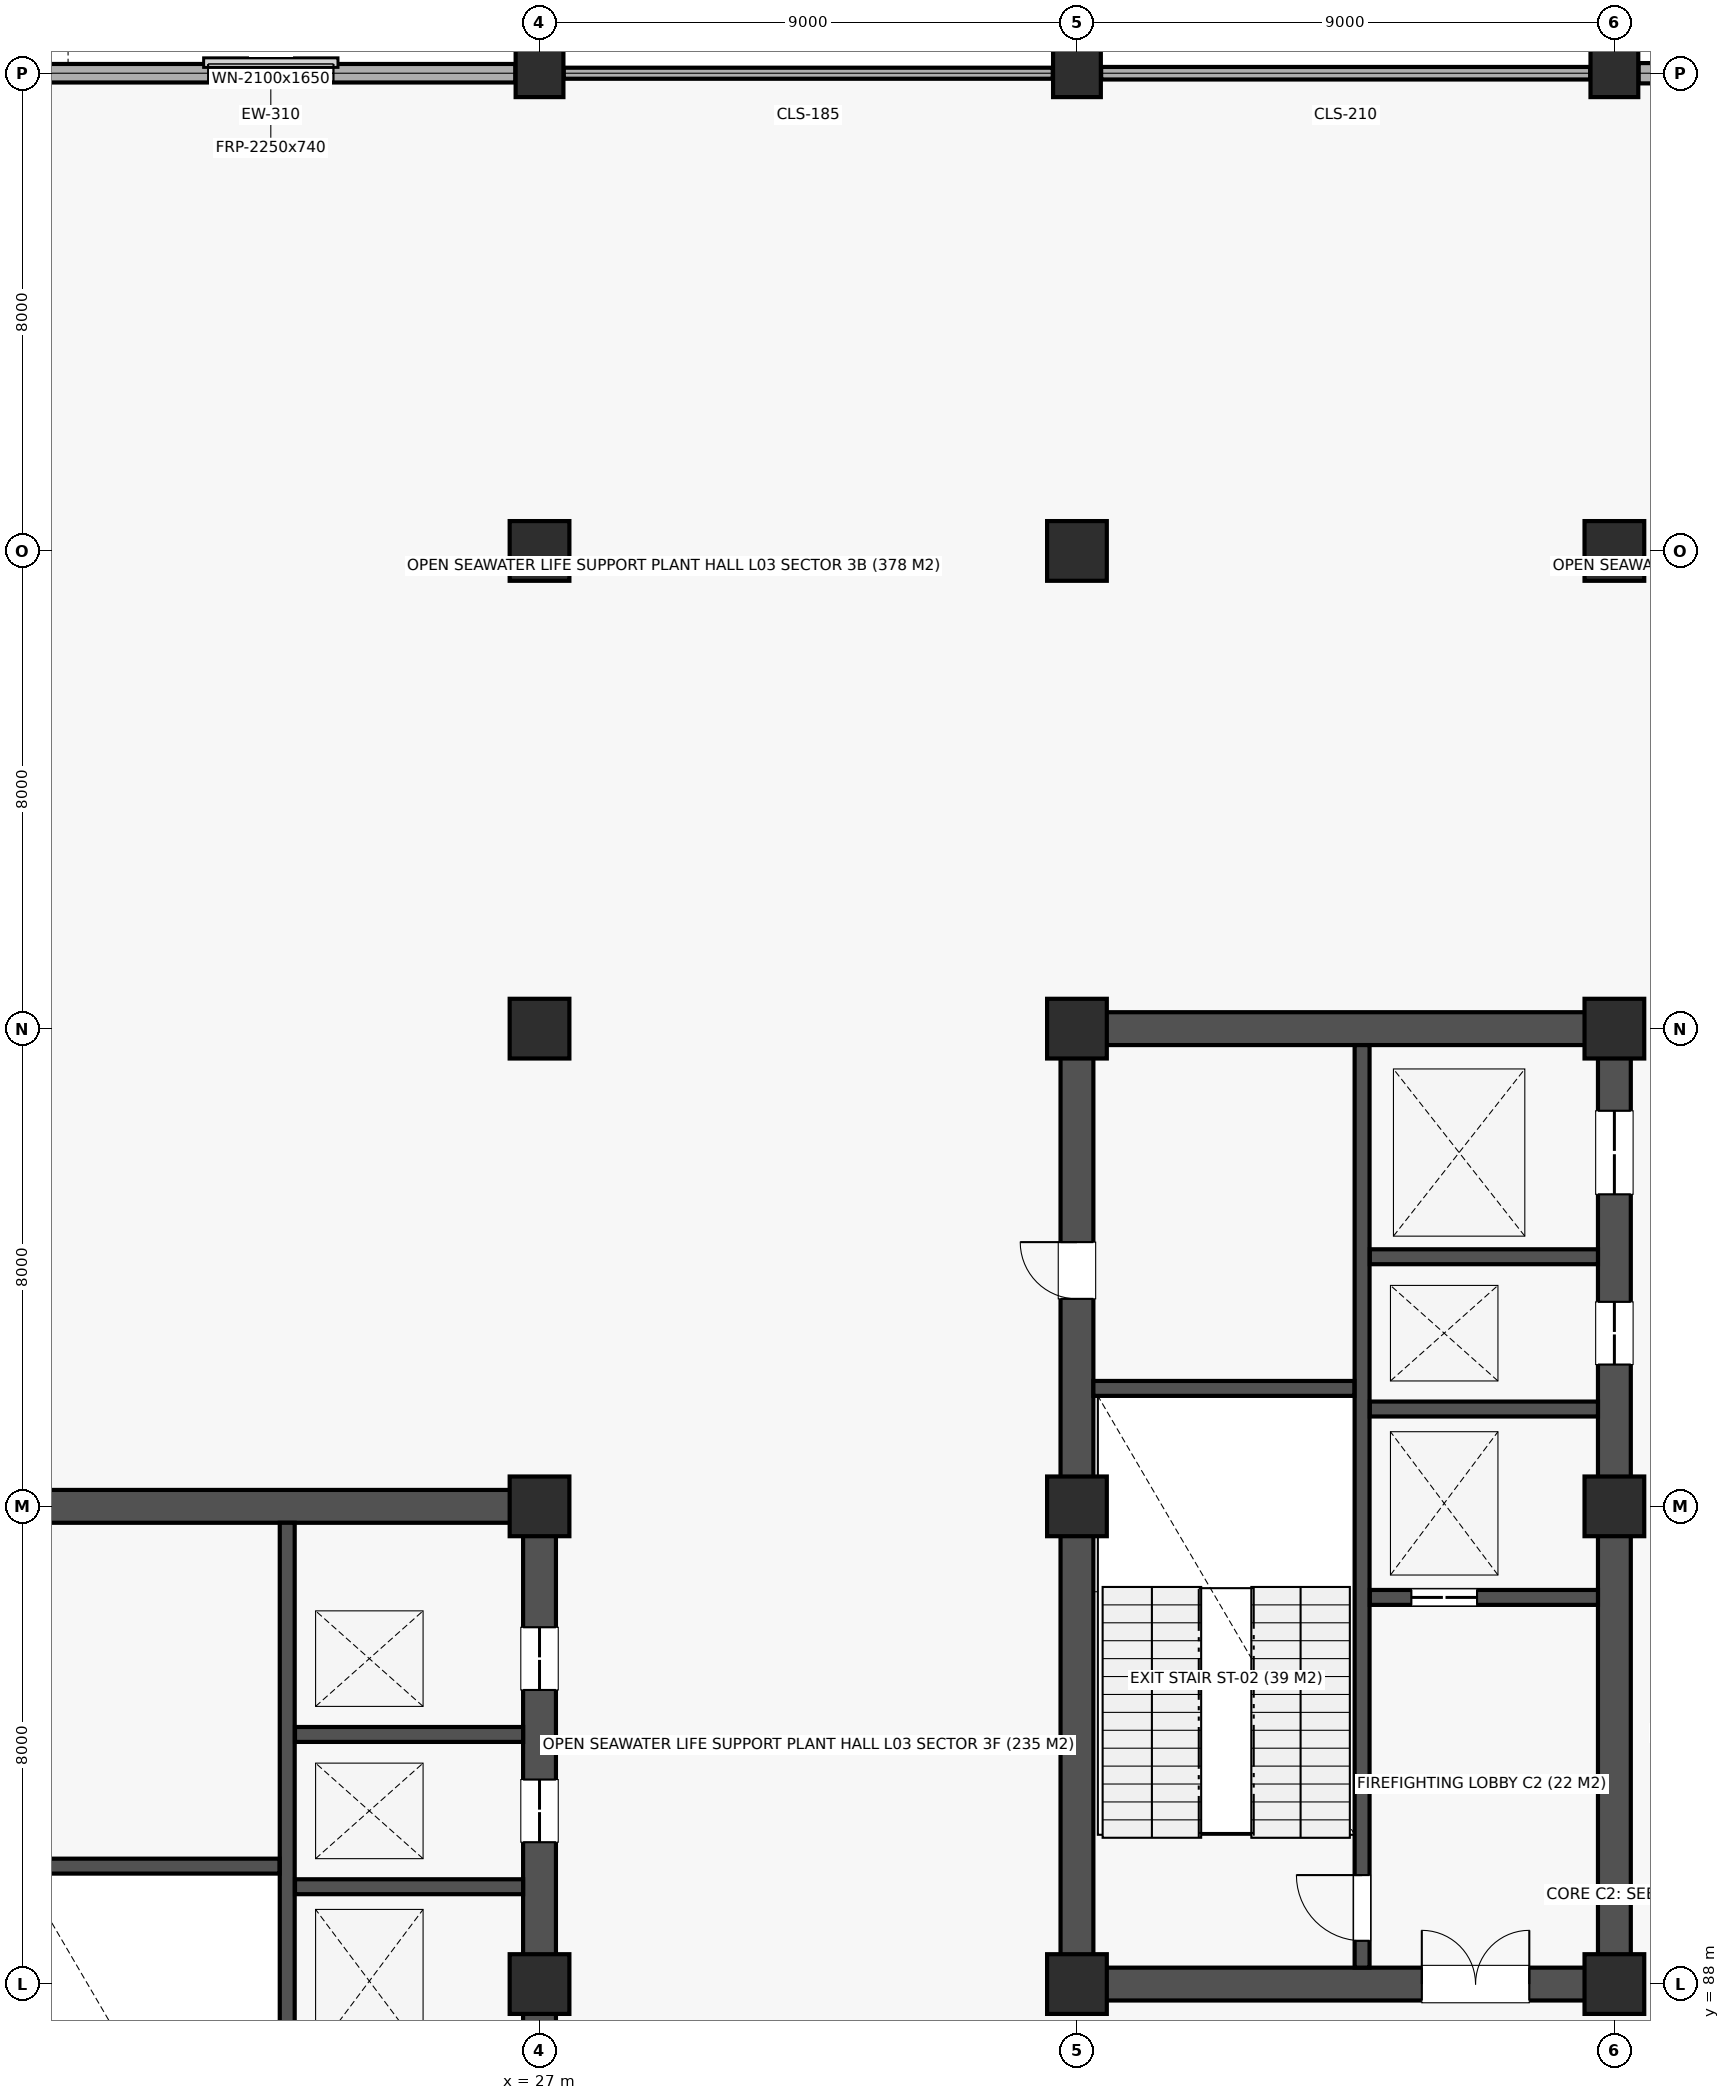
"""IFC4 building model, lengths in metres.
Left out: names, types, materials, properties, quantities, classifications, styles, units other than length and angle.
Written with IfcOpenShell. Run it as: python <this file> out.ifc"""

import sys

from ifc_helpers import new_model, si_unit, direction, frame, frame_2d, origin, origin_2d, place, context, subcontext, project, spatial, rectangle, extrude, element, fill, save


model = new_model("IFC4")
c1 = context("Model", 3, precision=1e-05, world=origin(), true_north=direction((0.0, 1.0)))
c2 = subcontext(c1, "Body", "Model", "MODEL_VIEW")
j1 = project(units=[si_unit("LENGTHUNIT", "METRE"), si_unit("PLANEANGLEUNIT", "RADIAN")], contexts=[c1])
p1 = place(None, origin())
s1 = spatial("IfcSite", under=j1, at=p1, CompositionType="ELEMENT")
p2 = place(p1, origin())
s2 = spatial("IfcBuilding", under=s1, at=p2, CompositionType="ELEMENT")
p3 = place(p2, frame((0.0, 0.0, 13.5)))
s3 = spatial("IfcBuildingStorey", under=s2, at=p3, CompositionType="ELEMENT", Elevation=13.5)
for number, where, z_axis, x_axis in (
    (1, (27.0, 88.0, 0.0), (0.0, 0.0, 1.0), (1.0, 0.0, 0.0)),
    (2, (27.0, 96.0, 0.0), (0.0, 0.0, 1.0), (1.0, 0.0, 0.0)),
    (3, (27.0, 104.0, 0.0), (0.0, 0.0, 1.0), (1.0, 0.0, 0.0)),
    (4, (27.0, 112.0, 0.0), (0.0, 0.0, 1.0), (1.0, 0.0, 0.0)),
):
    element("IfcColumn", number, at=place(p3, frame(where, z_axis=z_axis, x_axis=x_axis)), inside=s3, PredefinedType="COLUMN", context=c2, shape_type="SweptSolid", body=[
        extrude(rectangle(XDim=1.0, YDim=1.0, at=origin_2d()), origin(), (0.0, 0.0, 1.0), 4.5),
    ])
p4 = place(p3, frame((27.0, 120.0, 0.0), z_axis=(0.0, 0.0, 1.0), x_axis=(1.0, 0.0, 0.0)))
e5 = element("IfcColumn", 5, at=p4, inside=s3, PredefinedType="COLUMN", context=c2, shape_type="SweptSolid", body=[
    extrude(rectangle(XDim=0.8, YDim=0.8, at=origin_2d()), origin(), (0.0, 0.0, 1.0), 4.2),
])
for number, where, z_axis, x_axis in (
    (6, (36.0, 88.0, 0.0), (0.0, 0.0, 1.0), (1.0, 0.0, 0.0)),
    (7, (36.0, 96.0, 0.0), (0.0, 0.0, 1.0), (1.0, 0.0, 0.0)),
    (8, (36.0, 104.0, 0.0), (0.0, 0.0, 1.0), (1.0, 0.0, 0.0)),
    (9, (36.0, 112.0, 0.0), (0.0, 0.0, 1.0), (1.0, 0.0, 0.0)),
):
    element("IfcColumn", number, at=place(p3, frame(where, z_axis=z_axis, x_axis=x_axis)), inside=s3, PredefinedType="COLUMN", context=c2, shape_type="SweptSolid", body=[
        extrude(rectangle(XDim=1.0, YDim=1.0, at=origin_2d()), origin(), (0.0, 0.0, 1.0), 4.5),
    ])
p5 = place(p3, frame((36.0, 120.0, 0.0), z_axis=(0.0, 0.0, 1.0), x_axis=(1.0, 0.0, 0.0)))
e10 = element("IfcColumn", 10, at=p5, inside=s3, PredefinedType="COLUMN", context=c2, shape_type="SweptSolid", body=[
    extrude(rectangle(XDim=0.8, YDim=0.8, at=origin_2d()), origin(), (0.0, 0.0, 1.0), 4.2),
])
for number, where, z_axis, x_axis in (
    (11, (45.0, 88.0, 0.0), (0.0, 0.0, 1.0), (1.0, 0.0, 0.0)),
    (12, (45.0, 96.0, 0.0), (0.0, 0.0, 1.0), (1.0, 0.0, 0.0)),
    (13, (45.0, 104.0, 0.0), (0.0, 0.0, 1.0), (1.0, 0.0, 0.0)),
    (14, (45.0, 112.0, 0.0), (0.0, 0.0, 1.0), (1.0, 0.0, 0.0)),
):
    element("IfcColumn", number, at=place(p3, frame(where, z_axis=z_axis, x_axis=x_axis)), inside=s3, PredefinedType="COLUMN", context=c2, shape_type="SweptSolid", body=[
        extrude(rectangle(XDim=1.0, YDim=1.0, at=origin_2d()), origin(), (0.0, 0.0, 1.0), 4.5),
    ])
p6 = place(p3, frame((45.0, 120.0, 0.0), z_axis=(0.0, 0.0, 1.0), x_axis=(1.0, 0.0, 0.0)))
e15 = element("IfcColumn", 15, at=p6, inside=s3, PredefinedType="COLUMN", context=c2, shape_type="SweptSolid", body=[
    extrude(rectangle(XDim=0.8, YDim=0.8, at=origin_2d()), origin(), (0.0, 0.0, 1.0), 4.2),
])
p7 = place(p3, frame((18.275, 96.0, 0.0), z_axis=(0.0, 0.0, 1.0), x_axis=(1.0, 0.0, 0.0)))
e16 = element("IfcWall", 16, at=p7, inside=s3, PredefinedType="SHEAR", context=c2, shape_type="SweptSolid", body=[
    extrude(rectangle(XDim=8.45, YDim=0.55, at=frame_2d((4.225, 0.0))), origin(), (0.0, 0.0, 1.0), 4.2),
])
p8 = place(p3, frame((27.0, 80.275, 0.0), z_axis=(0.0, 0.0, 1.0), x_axis=(0.0, 1.0, 0.0)))
e17 = element("IfcWall", 17, at=p8, inside=s3, PredefinedType="SHEAR", context=c2, shape_type="SweptSolid", body=[
    extrude(rectangle(XDim=15.45, YDim=0.55, at=frame_2d((7.725, 0.0))), origin(), (0.0, 0.0, 1.0), 4.2),
])
p9 = place(p8, frame((10.1, 0.0, 0.0)))
e18 = element("IfcOpeningElement", 18, at=p9, cuts=e17, PredefinedType="OPENING", context=c2, shape_type="SweptSolid", body=[
    extrude(rectangle(XDim=1.05, YDim=2.12, at=frame_2d((0.525, 1.06))), frame((0.0, 0.287, 0.0), z_axis=(0.0, -1.0, 0.0), x_axis=(1.0, 0.0, 0.0)), (0.0, 0.0, 1.0), 0.574),
])
p10 = place(p8, frame((12.65, 0.0, 0.0)))
e19 = element("IfcOpeningElement", 19, at=p10, cuts=e17, PredefinedType="OPENING", context=c2, shape_type="SweptSolid", body=[
    extrude(rectangle(XDim=1.05, YDim=2.12, at=frame_2d((0.525, 1.06))), frame((0.0, 0.287, 0.0), z_axis=(0.0, -1.0, 0.0), x_axis=(1.0, 0.0, 0.0)), (0.0, 0.0, 1.0), 0.574),
])
p11 = place(p3, frame((22.775, 80.275, 0.0), z_axis=(0.0, 0.0, 1.0), x_axis=(0.0, 1.0, 0.0)))
e20 = element("IfcWall", 20, at=p11, inside=s3, PredefinedType="SOLIDWALL", context=c2, shape_type="SweptSolid", body=[
    extrude(rectangle(XDim=15.45, YDim=0.25, at=frame_2d((7.725, 0.0))), origin(), (0.0, 0.0, 1.0), 4.2),
])
p12 = place(p11, frame((0.45, 0.0, 0.0)))
e21 = element("IfcOpeningElement", 21, at=p12, cuts=e20, PredefinedType="OPENING", context=c2, shape_type="SweptSolid", body=[
    extrude(rectangle(XDim=1.1, YDim=2.15, at=frame_2d((0.55, 1.075))), frame((0.0, 0.137, 0.0), z_axis=(0.0, -1.0, 0.0), x_axis=(1.0, 0.0, 0.0)), (0.0, 0.0, 1.0), 0.274),
])
p13 = place(p3, frame((18.275, 89.975, 0.0), z_axis=(0.0, 0.0, 1.0), x_axis=(1.0, 0.0, 0.0)))
e22 = element("IfcWall", 22, at=p13, inside=s3, PredefinedType="SOLIDWALL", context=c2, shape_type="SweptSolid", body=[
    extrude(rectangle(XDim=4.37, YDim=0.25, at=frame_2d((2.185, 0.0))), origin(), (0.0, 0.0, 1.0), 4.2),
])
for number, where, z_axis, x_axis in (
    (23, (22.905, 89.63, 0.0), (0.0, 0.0, 1.0), (1.0, 0.0, 0.0)),
    (24, (22.905, 92.18, 0.0), (0.0, 0.0, 1.0), (1.0, 0.0, 0.0)),
):
    element("IfcWall", number, at=place(p3, frame(where, z_axis=z_axis, x_axis=x_axis)), inside=s3, PredefinedType="SOLIDWALL", context=c2, shape_type="SweptSolid", body=[
        extrude(rectangle(XDim=3.82, YDim=0.25, at=frame_2d((1.91, 0.0))), origin(), (0.0, 0.0, 1.0), 4.2),
    ])
p14 = place(p3, frame((36.275, 88.0, 0.0), z_axis=(0.0, 0.0, 1.0), x_axis=(1.0, 0.0, 0.0)))
e25 = element("IfcWall", 25, at=p14, inside=s3, PredefinedType="SHEAR", context=c2, shape_type="SweptSolid", body=[
    extrude(rectangle(XDim=8.45, YDim=0.55, at=frame_2d((4.225, 0.0))), origin(), (0.0, 0.0, 1.0), 4.2),
])
p15 = place(p14, frame((5.5, 0.0, 0.0)))
e26 = element("IfcOpeningElement", 26, at=p15, cuts=e25, PredefinedType="OPENING", context=c2, shape_type="SweptSolid", body=[
    extrude(rectangle(XDim=1.8, YDim=2.18, at=frame_2d((0.9, 1.09))), frame((0.0, 0.287, 0.0), z_axis=(0.0, -1.0, 0.0), x_axis=(1.0, 0.0, 0.0)), (0.0, 0.0, 1.0), 0.574),
])
p16 = place(p3, frame((36.275, 104.0, 0.0), z_axis=(0.0, 0.0, 1.0), x_axis=(1.0, 0.0, 0.0)))
e27 = element("IfcWall", 27, at=p16, inside=s3, PredefinedType="SHEAR", context=c2, shape_type="SweptSolid", body=[
    extrude(rectangle(XDim=8.45, YDim=0.55, at=frame_2d((4.225, 0.0))), origin(), (0.0, 0.0, 1.0), 4.2),
])
p17 = place(p3, frame((36.0, 88.275, 0.0), z_axis=(0.0, 0.0, 1.0), x_axis=(0.0, 1.0, 0.0)))
e28 = element("IfcWall", 28, at=p17, inside=s3, PredefinedType="SHEAR", context=c2, shape_type="SweptSolid", body=[
    extrude(rectangle(XDim=15.45, YDim=0.55, at=frame_2d((7.725, 0.0))), origin(), (0.0, 0.0, 1.0), 4.2),
])
p18 = place(p17, frame((11.2, 0.0, 0.0)))
e29 = element("IfcOpeningElement", 29, at=p18, cuts=e28, PredefinedType="OPENING", context=c2, shape_type="SweptSolid", body=[
    extrude(rectangle(XDim=0.95, YDim=2.1, at=frame_2d((0.475, 1.05))), frame((0.0, 0.287, 0.0), z_axis=(0.0, -1.0, 0.0), x_axis=(1.0, 0.0, 0.0)), (0.0, 0.0, 1.0), 0.574),
])
p19 = place(p3, frame((45.0, 88.275, 0.0), z_axis=(0.0, 0.0, 1.0), x_axis=(0.0, 1.0, 0.0)))
e30 = element("IfcWall", 30, at=p19, inside=s3, PredefinedType="SHEAR", context=c2, shape_type="SweptSolid", body=[
    extrude(rectangle(XDim=15.45, YDim=0.55, at=frame_2d((7.725, 0.0))), origin(), (0.0, 0.0, 1.0), 4.2),
])
p20 = place(p19, frame((10.1, 0.0, 0.0)))
e31 = element("IfcOpeningElement", 31, at=p20, cuts=e30, PredefinedType="OPENING", context=c2, shape_type="SweptSolid", body=[
    extrude(rectangle(XDim=1.05, YDim=2.12, at=frame_2d((0.525, 1.06))), frame((0.0, 0.287, 0.0), z_axis=(0.0, -1.0, 0.0), x_axis=(1.0, 0.0, 0.0)), (0.0, 0.0, 1.0), 0.574),
])
p21 = place(p19, frame((12.95, 0.0, 0.0)))
e32 = element("IfcOpeningElement", 32, at=p21, cuts=e30, PredefinedType="OPENING", context=c2, shape_type="SweptSolid", body=[
    extrude(rectangle(XDim=1.4, YDim=2.2, at=frame_2d((0.7, 1.1))), frame((0.0, 0.287, 0.0), z_axis=(0.0, -1.0, 0.0), x_axis=(1.0, 0.0, 0.0)), (0.0, 0.0, 1.0), 0.574),
])
p22 = place(p3, frame((40.775, 88.275, 0.0), z_axis=(0.0, 0.0, 1.0), x_axis=(0.0, 1.0, 0.0)))
e33 = element("IfcWall", 33, at=p22, inside=s3, PredefinedType="SOLIDWALL", context=c2, shape_type="SweptSolid", body=[
    extrude(rectangle(XDim=15.45, YDim=0.25, at=frame_2d((7.725, 0.0))), origin(), (0.0, 0.0, 1.0), 4.2),
])
p23 = place(p22, frame((0.45, 0.0, 0.0)))
e34 = element("IfcOpeningElement", 34, at=p23, cuts=e33, PredefinedType="OPENING", context=c2, shape_type="SweptSolid", body=[
    extrude(rectangle(XDim=1.1, YDim=2.15, at=frame_2d((0.55, 1.075))), frame((0.0, 0.137, 0.0), z_axis=(0.0, -1.0, 0.0), x_axis=(1.0, 0.0, 0.0)), (0.0, 0.0, 1.0), 0.274),
])
p24 = place(p3, frame((36.275, 97.975, 0.0), z_axis=(0.0, 0.0, 1.0), x_axis=(1.0, 0.0, 0.0)))
e35 = element("IfcWall", 35, at=p24, inside=s3, PredefinedType="SOLIDWALL", context=c2, shape_type="SweptSolid", body=[
    extrude(rectangle(XDim=4.37, YDim=0.25, at=frame_2d((2.185, 0.0))), origin(), (0.0, 0.0, 1.0), 4.2),
])
p25 = place(p3, frame((40.905, 94.475, 0.0), z_axis=(0.0, 0.0, 1.0), x_axis=(1.0, 0.0, 0.0)))
e36 = element("IfcWall", 36, at=p25, inside=s3, PredefinedType="SOLIDWALL", context=c2, shape_type="SweptSolid", body=[
    extrude(rectangle(XDim=3.82, YDim=0.25, at=frame_2d((1.91, 0.0))), origin(), (0.0, 0.0, 1.0), 4.2),
])
p26 = place(p25, frame((0.695, 0.0, 0.0)))
e37 = element("IfcOpeningElement", 37, at=p26, cuts=e36, PredefinedType="OPENING", context=c2, shape_type="SweptSolid", body=[
    extrude(rectangle(XDim=1.1, YDim=2.12, at=frame_2d((0.55, 1.06))), frame((0.0, 0.137, 0.0), z_axis=(0.0, -1.0, 0.0), x_axis=(1.0, 0.0, 0.0)), (0.0, 0.0, 1.0), 0.274),
])
for number, where, z_axis, x_axis in (
    (38, (40.905, 97.63, 0.0), (0.0, 0.0, 1.0), (1.0, 0.0, 0.0)),
    (39, (40.905, 100.18, 0.0), (0.0, 0.0, 1.0), (1.0, 0.0, 0.0)),
):
    element("IfcWall", number, at=place(p3, frame(where, z_axis=z_axis, x_axis=x_axis)), inside=s3, PredefinedType="SOLIDWALL", context=c2, shape_type="SweptSolid", body=[
        extrude(rectangle(XDim=3.82, YDim=0.25, at=frame_2d((1.91, 0.0))), origin(), (0.0, 0.0, 1.0), 4.2),
    ])
p27 = place(p3, frame((18.405, 120.0, 0.0), z_axis=(0.0, 0.0, 1.0), x_axis=(1.0, 0.0, 0.0)))
e40 = element("IfcWall", 40, at=p27, inside=s3, PredefinedType="STANDARD", context=c2, shape_type="SweptSolid", body=[
    extrude(rectangle(XDim=8.19, YDim=0.31, at=frame_2d((4.095, 0.0))), origin(), (0.0, 0.0, 1.0), 3.48),
])
p28 = place(p27, frame((3.045, 0.0, 0.85)))
e41 = element("IfcOpeningElement", 41, at=p28, cuts=e40, PredefinedType="OPENING", context=c2, shape_type="SweptSolid", body=[
    extrude(rectangle(XDim=2.1, YDim=1.65, at=frame_2d((1.05, 0.825))), frame((0.0, 0.167, 0.0), z_axis=(0.0, -1.0, 0.0), x_axis=(1.0, 0.0, 0.0)), (0.0, 0.0, 1.0), 0.334),
])
p29 = place(p3, frame((27.405, 120.0, 0.0), z_axis=(0.0, 0.0, 1.0), x_axis=(1.0, 0.0, 0.0)))
e42 = element("IfcWall", 42, at=p29, inside=s3, PredefinedType="ELEMENTEDWALL", context=c2, shape_type="SweptSolid", body=[
    extrude(rectangle(XDim=8.19, YDim=0.185, at=frame_2d((4.095, 0.0))), origin(), (0.0, 0.0, 1.0), 3.48),
])
p30 = place(p3, frame((36.405, 120.0, 0.0), z_axis=(0.0, 0.0, 1.0), x_axis=(1.0, 0.0, 0.0)))
e43 = element("IfcWall", 43, at=p30, inside=s3, PredefinedType="ELEMENTEDWALL", context=c2, shape_type="SweptSolid", body=[
    extrude(rectangle(XDim=8.19, YDim=0.21, at=frame_2d((4.095, 0.0))), origin(), (0.0, 0.0, 1.0), 3.48),
])
p31 = place(p3, frame((45.405, 120.0, 0.0), z_axis=(0.0, 0.0, 1.0), x_axis=(1.0, 0.0, 0.0)))
e44 = element("IfcWall", 44, at=p31, inside=s3, PredefinedType="STANDARD", context=c2, shape_type="SweptSolid", body=[
    extrude(rectangle(XDim=8.19, YDim=0.34, at=frame_2d((4.095, 0.0))), origin(), (0.0, 0.0, 1.0), 3.48),
])
p32 = place(p31, frame((3.145, 0.0, 0.85)))
e45 = element("IfcOpeningElement", 45, at=p32, cuts=e44, PredefinedType="OPENING", context=c2, shape_type="SweptSolid", body=[
    extrude(rectangle(XDim=1.9, YDim=1.65, at=frame_2d((0.95, 0.825))), frame((0.0, 0.182, 0.0), z_axis=(0.0, -1.0, 0.0), x_axis=(1.0, 0.0, 0.0)), (0.0, 0.0, 1.0), 0.364),
])
p33 = place(p9, origin())
e46 = element("IfcDoor", 46, at=p33, inside=s3, OperationType="DOUBLE_DOOR_SLIDING", PredefinedType="DOOR", context=c2, shape_type="SweptSolid", body=[
    extrude(rectangle(XDim=1.05, YDim=2.12, at=frame_2d((0.525, 1.06))), frame((0.0, 0.025, 0.0), z_axis=(0.0, -1.0, 0.0), x_axis=(1.0, 0.0, 0.0)), (0.0, 0.0, 1.0), 0.05),
])
fill(e18, e46)
p34 = place(p10, origin())
e47 = element("IfcDoor", 47, at=p34, inside=s3, OperationType="DOUBLE_DOOR_SLIDING", PredefinedType="DOOR", context=c2, shape_type="SweptSolid", body=[
    extrude(rectangle(XDim=1.05, YDim=2.12, at=frame_2d((0.525, 1.06))), frame((0.0, 0.025, 0.0), z_axis=(0.0, -1.0, 0.0), x_axis=(1.0, 0.0, 0.0)), (0.0, 0.0, 1.0), 0.05),
])
fill(e19, e47)
p35 = place(p15, origin())
e48 = element("IfcDoor", 48, at=p35, inside=s3, OperationType="DOUBLE_DOOR_SINGLE_SWING", PredefinedType="DOOR", context=c2, shape_type="SweptSolid", body=[
    extrude(rectangle(XDim=1.8, YDim=2.18, at=frame_2d((0.9, 1.09))), frame((0.0, 0.025, 0.0), z_axis=(0.0, -1.0, 0.0), x_axis=(1.0, 0.0, 0.0)), (0.0, 0.0, 1.0), 0.05),
])
fill(e26, e48)
p36 = place(p23, origin())
e49 = element("IfcDoor", 49, at=p36, inside=s3, OperationType="SINGLE_SWING_RIGHT", PredefinedType="DOOR", context=c2, shape_type="SweptSolid", body=[
    extrude(rectangle(XDim=1.1, YDim=2.15, at=frame_2d((0.55, 1.075))), frame((0.0, 0.025, 0.0), z_axis=(0.0, -1.0, 0.0), x_axis=(1.0, 0.0, 0.0)), (0.0, 0.0, 1.0), 0.05),
])
fill(e34, e49)
p37 = place(p18, origin())
e50 = element("IfcDoor", 50, at=p37, inside=s3, OperationType="SINGLE_SWING_RIGHT", PredefinedType="DOOR", context=c2, shape_type="SweptSolid", body=[
    extrude(rectangle(XDim=0.95, YDim=2.1, at=frame_2d((0.475, 1.05))), frame((0.0, 0.025, 0.0), z_axis=(0.0, -1.0, 0.0), x_axis=(1.0, 0.0, 0.0)), (0.0, 0.0, 1.0), 0.05),
])
fill(e29, e50)
p38 = place(p26, origin())
e51 = element("IfcDoor", 51, at=p38, inside=s3, OperationType="DOUBLE_DOOR_SLIDING", PredefinedType="DOOR", context=c2, shape_type="SweptSolid", body=[
    extrude(rectangle(XDim=1.1, YDim=2.12, at=frame_2d((0.55, 1.06))), frame((0.0, 0.025, 0.0), z_axis=(0.0, -1.0, 0.0), x_axis=(1.0, 0.0, 0.0)), (0.0, 0.0, 1.0), 0.05),
])
fill(e37, e51)
p39 = place(p20, origin())
e52 = element("IfcDoor", 52, at=p39, inside=s3, OperationType="DOUBLE_DOOR_SLIDING", PredefinedType="DOOR", context=c2, shape_type="SweptSolid", body=[
    extrude(rectangle(XDim=1.05, YDim=2.12, at=frame_2d((0.525, 1.06))), frame((0.0, 0.025, 0.0), z_axis=(0.0, -1.0, 0.0), x_axis=(1.0, 0.0, 0.0)), (0.0, 0.0, 1.0), 0.05),
])
fill(e31, e52)
p40 = place(p21, origin())
e53 = element("IfcDoor", 53, at=p40, inside=s3, OperationType="DOUBLE_DOOR_SLIDING", PredefinedType="DOOR", context=c2, shape_type="SweptSolid", body=[
    extrude(rectangle(XDim=1.4, YDim=2.2, at=frame_2d((0.7, 1.1))), frame((0.0, 0.025, 0.0), z_axis=(0.0, -1.0, 0.0), x_axis=(1.0, 0.0, 0.0)), (0.0, 0.0, 1.0), 0.05),
])
fill(e32, e53)
p41 = place(p28, origin())
e54 = element("IfcWindow", 54, at=p41, inside=s3, PartitioningType="SINGLE_PANEL", PredefinedType="WINDOW", context=c2, shape_type="SweptSolid", body=[
    extrude(rectangle(XDim=2.1, YDim=1.65, at=frame_2d((1.05, 0.825))), frame((0.0, 0.03, 0.0), z_axis=(0.0, -1.0, 0.0), x_axis=(1.0, 0.0, 0.0)), (0.0, 0.0, 1.0), 0.06),
])
fill(e41, e54)
save(model, sys.argv[1])
